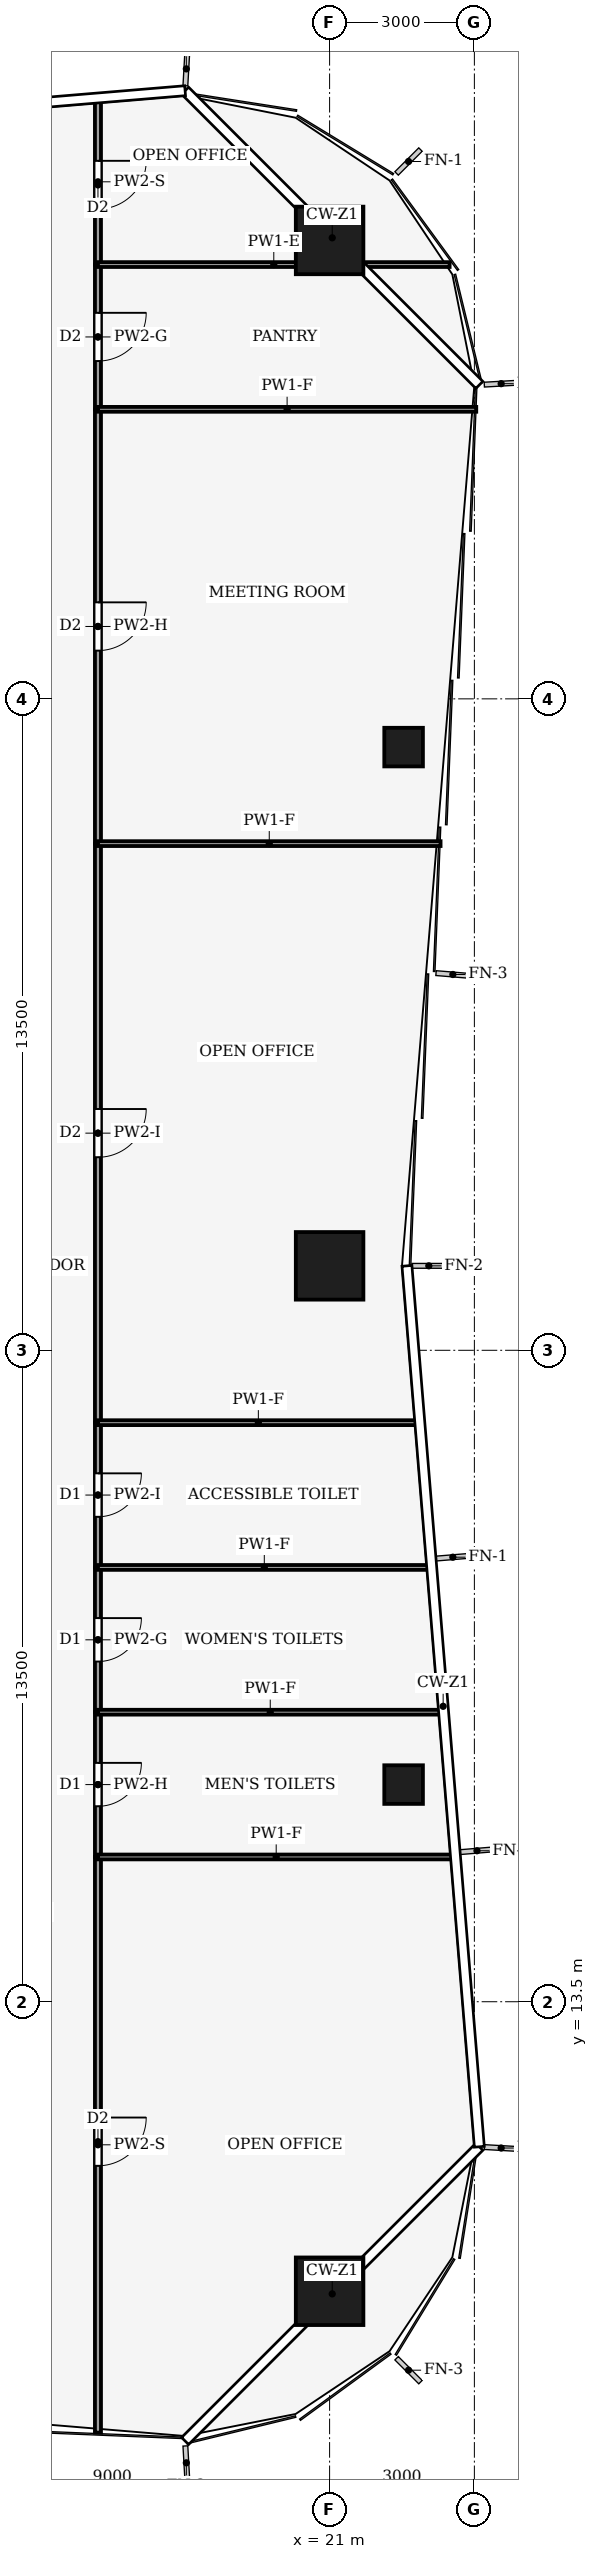
"""IFC4 building model, lengths in metres.
Left out: names, types, materials, properties, quantities, classifications, styles, units other than length and angle.
Written with IfcOpenShell. Run it as: python <this file> out.ifc"""

import sys

from ifc_helpers import new_model, si_unit, direction, frame, frame_2d, origin, origin_2d, place, context, subcontext, project, spatial, rectangle, hollow_rectangle, extrude, element, fill, save


model = new_model("IFC4")
c1 = context("Model", 3, precision=1e-05, world=origin(), true_north=direction((0.0, 1.0)))
c2 = subcontext(c1, "Body", "Model", "MODEL_VIEW")
j1 = project(units=[si_unit("LENGTHUNIT", "METRE"), si_unit("PLANEANGLEUNIT", "RADIAN")], contexts=[c1])
p1 = place(None, origin())
s1 = spatial("IfcSite", under=j1, at=p1, CompositionType="ELEMENT")
p2 = place(p1, origin())
s2 = spatial("IfcBuilding", under=s1, at=p2, CompositionType="ELEMENT")
p3 = place(p2, frame((0.0, 0.0, 70.0)))
s3 = spatial("IfcBuildingStorey", under=s2, at=p3, CompositionType="ELEMENT", Elevation=70.0)
for number, where, z_axis, x_axis in (
    (1, (21.0, 50.0, 0.0), (0.0, 0.0, 1.0), (1.0, 0.0, 0.0)),
    (2, (21.0, 28.75, 0.0), (0.0, 0.0, 1.0), (1.0, 0.0, 0.0)),
    (3, (21.0, 7.5, 0.0), (0.0, 0.0, 1.0), (1.0, 0.0, 0.0)),
):
    element("IfcColumn", number, at=place(p3, frame(where, z_axis=z_axis, x_axis=x_axis)), inside=s3, PredefinedType="COLUMN", context=c2, shape_type="SweptSolid", body=[
        extrude(hollow_rectangle(XDim=1.4, YDim=1.4, WallThickness=0.08, at=origin_2d()), origin(), (0.0, 0.0, 1.0), 4.0),
    ])
for number, where, z_axis, x_axis in (
    (4, (22.534, 18.0, 0.0), (0.0, 0.0, 1.0), (1.0, 0.0, 0.0)),
    (5, (22.534, 39.5, 0.0), (0.0, 0.0, 1.0), (1.0, 0.0, 0.0)),
):
    element("IfcColumn", number, at=place(p3, frame(where, z_axis=z_axis, x_axis=x_axis)), inside=s3, PredefinedType="COLUMN", context=c2, shape_type="SweptSolid", body=[
        extrude(hollow_rectangle(XDim=0.8, YDim=0.8, WallThickness=0.04, at=origin_2d()), origin(), (0.0, 0.0, 1.0), 4.0),
    ])
p4 = place(p3, frame((16.2, 16.5, 0.0), z_axis=(0.0, 0.0, 1.0), x_axis=(0.0, -1.0, 0.0)))
e6 = element("IfcWall", 6, at=p4, inside=s3, PredefinedType="PARTITIONING", context=c2, shape_type="SweptSolid", body=[
    extrude(rectangle(XDim=11.93, YDim=0.125, at=frame_2d((5.965, 0.0))), origin(), (0.0, 0.0, 1.0), 3.04),
])
p5 = place(p4, frame((5.4, 0.0, 0.0)))
e7 = element("IfcOpeningElement", 7, at=p5, cuts=e6, PredefinedType="OPENING", context=c2, shape_type="SweptSolid", body=[
    extrude(rectangle(XDim=1.0, YDim=2.1, at=frame_2d((0.5, 1.05))), frame((0.0, 0.073, 0.0), z_axis=(0.0, -1.0, 0.0), x_axis=(1.0, 0.0, 0.0)), (0.0, 0.0, 1.0), 0.145),
])
p6 = place(p3, frame((16.2, 19.5, 0.0), z_axis=(0.0, 0.0, 1.0), x_axis=(0.0, -1.0, 0.0)))
e8 = element("IfcWall", 8, at=p6, inside=s3, PredefinedType="PARTITIONING", context=c2, shape_type="SweptSolid", body=[
    extrude(rectangle(XDim=3.0, YDim=0.125, at=frame_2d((1.5, 0.0))), origin(), (0.0, 0.0, 1.0), 3.14),
])
p7 = place(p6, frame((1.05, 0.0, 0.0)))
e9 = element("IfcOpeningElement", 9, at=p7, cuts=e8, PredefinedType="OPENING", context=c2, shape_type="SweptSolid", body=[
    extrude(rectangle(XDim=0.9, YDim=2.1, at=frame_2d((0.45, 1.05))), frame((0.0, 0.073, 0.0), z_axis=(0.0, -1.0, 0.0), x_axis=(1.0, 0.0, 0.0)), (0.0, 0.0, 1.0), 0.145),
])
p8 = place(p3, frame((16.2, 22.5, 0.0), z_axis=(0.0, 0.0, 1.0), x_axis=(0.0, -1.0, 0.0)))
e10 = element("IfcWall", 10, at=p8, inside=s3, PredefinedType="PARTITIONING", context=c2, shape_type="SweptSolid", body=[
    extrude(rectangle(XDim=3.0, YDim=0.125, at=frame_2d((1.5, 0.0))), origin(), (0.0, 0.0, 1.0), 3.87),
])
p9 = place(p8, frame((1.05, 0.0, 0.0)))
e11 = element("IfcOpeningElement", 11, at=p9, cuts=e10, PredefinedType="OPENING", context=c2, shape_type="SweptSolid", body=[
    extrude(rectangle(XDim=0.9, YDim=2.1, at=frame_2d((0.45, 1.05))), frame((0.0, 0.073, 0.0), z_axis=(0.0, -1.0, 0.0), x_axis=(1.0, 0.0, 0.0)), (0.0, 0.0, 1.0), 0.145),
])
p10 = place(p3, frame((16.2, 25.5, 0.0), z_axis=(0.0, 0.0, 1.0), x_axis=(0.0, -1.0, 0.0)))
e12 = element("IfcWall", 12, at=p10, inside=s3, PredefinedType="PARTITIONING", context=c2, shape_type="SweptSolid", body=[
    extrude(rectangle(XDim=3.0, YDim=0.125, at=frame_2d((1.5, 0.0))), origin(), (0.0, 0.0, 1.0), 3.48),
])
p11 = place(p10, frame((1.05, 0.0, 0.0)))
e13 = element("IfcOpeningElement", 13, at=p11, cuts=e12, PredefinedType="OPENING", context=c2, shape_type="SweptSolid", body=[
    extrude(rectangle(XDim=0.9, YDim=2.1, at=frame_2d((0.45, 1.05))), frame((0.0, 0.073, 0.0), z_axis=(0.0, -1.0, 0.0), x_axis=(1.0, 0.0, 0.0)), (0.0, 0.0, 1.0), 0.145),
])
p12 = place(p3, frame((16.2, 37.5, 0.0), z_axis=(0.0, 0.0, 1.0), x_axis=(0.0, -1.0, 0.0)))
e14 = element("IfcWall", 14, at=p12, inside=s3, PredefinedType="PARTITIONING", context=c2, shape_type="SweptSolid", body=[
    extrude(rectangle(XDim=12.0, YDim=0.125, at=frame_2d((6.0, 0.0))), origin(), (0.0, 0.0, 1.0), 3.48),
])
p13 = place(p12, frame((5.5, 0.0, 0.0)))
e15 = element("IfcOpeningElement", 15, at=p13, cuts=e14, PredefinedType="OPENING", context=c2, shape_type="SweptSolid", body=[
    extrude(rectangle(XDim=1.0, YDim=2.1, at=frame_2d((0.5, 1.05))), frame((0.0, 0.073, 0.0), z_axis=(0.0, -1.0, 0.0), x_axis=(1.0, 0.0, 0.0)), (0.0, 0.0, 1.0), 0.145),
])
p14 = place(p3, frame((16.2, 46.5, 0.0), z_axis=(0.0, 0.0, 1.0), x_axis=(0.0, -1.0, 0.0)))
e16 = element("IfcWall", 16, at=p14, inside=s3, PredefinedType="PARTITIONING", context=c2, shape_type="SweptSolid", body=[
    extrude(rectangle(XDim=9.0, YDim=0.125, at=frame_2d((4.5, 0.0))), origin(), (0.0, 0.0, 1.0), 3.14),
])
p15 = place(p14, frame((4.0, 0.0, 0.0)))
e17 = element("IfcOpeningElement", 17, at=p15, cuts=e16, PredefinedType="OPENING", context=c2, shape_type="SweptSolid", body=[
    extrude(rectangle(XDim=1.0, YDim=2.1, at=frame_2d((0.5, 1.05))), frame((0.0, 0.073, 0.0), z_axis=(0.0, -1.0, 0.0), x_axis=(1.0, 0.0, 0.0)), (0.0, 0.0, 1.0), 0.145),
])
p16 = place(p3, frame((16.2, 49.5, 0.0), z_axis=(0.0, 0.0, 1.0), x_axis=(0.0, -1.0, 0.0)))
e18 = element("IfcWall", 18, at=p16, inside=s3, PredefinedType="PARTITIONING", context=c2, shape_type="SweptSolid", body=[
    extrude(rectangle(XDim=3.0, YDim=0.125, at=frame_2d((1.5, 0.0))), origin(), (0.0, 0.0, 1.0), 3.87),
])
p17 = place(p16, frame((1.0, 0.0, 0.0)))
e19 = element("IfcOpeningElement", 19, at=p17, cuts=e18, PredefinedType="OPENING", context=c2, shape_type="SweptSolid", body=[
    extrude(rectangle(XDim=1.0, YDim=2.1, at=frame_2d((0.5, 1.05))), frame((0.0, 0.073, 0.0), z_axis=(0.0, -1.0, 0.0), x_axis=(1.0, 0.0, 0.0)), (0.0, 0.0, 1.0), 0.145),
])
p18 = place(p3, frame((16.2, 52.93, 0.0), z_axis=(0.0, 0.0, 1.0), x_axis=(0.0, -1.0, 0.0)))
e20 = element("IfcWall", 20, at=p18, inside=s3, PredefinedType="PARTITIONING", context=c2, shape_type="SweptSolid", body=[
    extrude(rectangle(XDim=3.43, YDim=0.125, at=frame_2d((1.715, 0.0))), origin(), (0.0, 0.0, 1.0), 3.04),
])
p19 = place(p18, frame((1.28, 0.0, 0.0)))
e21 = element("IfcOpeningElement", 21, at=p19, cuts=e20, PredefinedType="OPENING", context=c2, shape_type="SweptSolid", body=[
    extrude(rectangle(XDim=1.0, YDim=2.1, at=frame_2d((0.5, 1.05))), frame((0.0, 0.073, 0.0), z_axis=(0.0, -1.0, 0.0), x_axis=(1.0, 0.0, 0.0)), (0.0, 0.0, 1.0), 0.145),
])
p20 = place(p3, frame((23.587, 16.5, 0.0), z_axis=(0.0, 0.0, 1.0), x_axis=(-1.0, 0.0, 0.0)))
e22 = element("IfcWall", 22, at=p20, inside=s3, PredefinedType="PARTITIONING", context=c2, shape_type="SweptSolid", body=[
    extrude(rectangle(XDim=7.387, YDim=0.1, at=frame_2d((3.693, 0.0))), origin(), (0.0, 0.0, 1.0), 3.04),
])
p21 = place(p3, frame((23.34, 19.5, 0.0), z_axis=(0.0, 0.0, 1.0), x_axis=(-1.0, 0.0, 0.0)))
e23 = element("IfcWall", 23, at=p21, inside=s3, PredefinedType="PARTITIONING", context=c2, shape_type="SweptSolid", body=[
    extrude(rectangle(XDim=7.14, YDim=0.1, at=frame_2d((3.57, 0.0))), origin(), (0.0, 0.0, 1.0), 3.04),
])
p22 = place(p3, frame((23.094, 22.5, 0.0), z_axis=(0.0, 0.0, 1.0), x_axis=(-1.0, 0.0, 0.0)))
e24 = element("IfcWall", 24, at=p22, inside=s3, PredefinedType="PARTITIONING", context=c2, shape_type="SweptSolid", body=[
    extrude(rectangle(XDim=6.894, YDim=0.1, at=frame_2d((3.447, 0.0))), origin(), (0.0, 0.0, 1.0), 3.04),
])
p23 = place(p3, frame((22.847, 25.5, 0.0), z_axis=(0.0, 0.0, 1.0), x_axis=(-1.0, 0.0, 0.0)))
e25 = element("IfcWall", 25, at=p23, inside=s3, PredefinedType="PARTITIONING", context=c2, shape_type="SweptSolid", body=[
    extrude(rectangle(XDim=6.647, YDim=0.1, at=frame_2d((3.324, 0.0))), origin(), (0.0, 0.0, 1.0), 3.04),
])
p24 = place(p3, frame((23.299, 37.5, 0.0), z_axis=(0.0, 0.0, 1.0), x_axis=(-1.0, 0.0, 0.0)))
e26 = element("IfcWall", 26, at=p24, inside=s3, PredefinedType="PARTITIONING", context=c2, shape_type="SweptSolid", body=[
    extrude(rectangle(XDim=7.099, YDim=0.1, at=frame_2d((3.55, 0.0))), origin(), (0.0, 0.0, 1.0), 3.04),
])
p25 = place(p3, frame((24.039, 46.5, 0.0), z_axis=(0.0, 0.0, 1.0), x_axis=(-1.0, 0.0, 0.0)))
e27 = element("IfcWall", 27, at=p25, inside=s3, PredefinedType="PARTITIONING", context=c2, shape_type="SweptSolid", body=[
    extrude(rectangle(XDim=7.839, YDim=0.1, at=frame_2d((3.919, 0.0))), origin(), (0.0, 0.0, 1.0), 3.04),
])
p26 = place(p3, frame((23.487, 49.5, 0.0), z_axis=(0.0, 0.0, 1.0), x_axis=(-1.0, 0.0, 0.0)))
e28 = element("IfcWall", 28, at=p26, inside=s3, PredefinedType="PARTITIONING", context=c2, shape_type="SweptSolid", body=[
    extrude(rectangle(XDim=7.287, YDim=0.1, at=frame_2d((3.644, 0.0))), origin(), (0.0, 0.0, 1.0), 3.34),
])
p27 = place(p5, origin())
e29 = element("IfcDoor", 29, at=p27, inside=s3, OperationType="SINGLE_SWING_LEFT", PredefinedType="DOOR", context=c2, shape_type="SweptSolid", body=[
    extrude(rectangle(XDim=1.0, YDim=2.1, at=frame_2d((0.5, 1.05))), frame((0.0, 0.025, 0.0), z_axis=(0.0, -1.0, 0.0), x_axis=(1.0, 0.0, 0.0)), (0.0, 0.0, 1.0), 0.05),
])
fill(e7, e29)
p28 = place(p7, origin())
e30 = element("IfcDoor", 30, at=p28, inside=s3, OperationType="SINGLE_SWING_RIGHT", PredefinedType="DOOR", context=c2, shape_type="SweptSolid", body=[
    extrude(rectangle(XDim=0.9, YDim=2.1, at=frame_2d((0.45, 1.05))), frame((0.0, 0.025, 0.0), z_axis=(0.0, -1.0, 0.0), x_axis=(1.0, 0.0, 0.0)), (0.0, 0.0, 1.0), 0.05),
])
fill(e9, e30)
p29 = place(p9, origin())
e31 = element("IfcDoor", 31, at=p29, inside=s3, OperationType="SINGLE_SWING_LEFT", PredefinedType="DOOR", context=c2, shape_type="SweptSolid", body=[
    extrude(rectangle(XDim=0.9, YDim=2.1, at=frame_2d((0.45, 1.05))), frame((0.0, 0.025, 0.0), z_axis=(0.0, -1.0, 0.0), x_axis=(1.0, 0.0, 0.0)), (0.0, 0.0, 1.0), 0.05),
])
fill(e11, e31)
p30 = place(p11, origin())
e32 = element("IfcDoor", 32, at=p30, inside=s3, OperationType="SINGLE_SWING_RIGHT", PredefinedType="DOOR", context=c2, shape_type="SweptSolid", body=[
    extrude(rectangle(XDim=0.9, YDim=2.1, at=frame_2d((0.45, 1.05))), frame((0.0, 0.025, 0.0), z_axis=(0.0, -1.0, 0.0), x_axis=(1.0, 0.0, 0.0)), (0.0, 0.0, 1.0), 0.05),
])
fill(e13, e32)
p31 = place(p13, origin())
e33 = element("IfcDoor", 33, at=p31, inside=s3, OperationType="SINGLE_SWING_LEFT", PredefinedType="DOOR", context=c2, shape_type="SweptSolid", body=[
    extrude(rectangle(XDim=1.0, YDim=2.1, at=frame_2d((0.5, 1.05))), frame((0.0, 0.025, 0.0), z_axis=(0.0, -1.0, 0.0), x_axis=(1.0, 0.0, 0.0)), (0.0, 0.0, 1.0), 0.05),
])
fill(e15, e33)
p32 = place(p15, origin())
e34 = element("IfcDoor", 34, at=p32, inside=s3, OperationType="SINGLE_SWING_RIGHT", PredefinedType="DOOR", context=c2, shape_type="SweptSolid", body=[
    extrude(rectangle(XDim=1.0, YDim=2.1, at=frame_2d((0.5, 1.05))), frame((0.0, 0.025, 0.0), z_axis=(0.0, -1.0, 0.0), x_axis=(1.0, 0.0, 0.0)), (0.0, 0.0, 1.0), 0.05),
])
fill(e17, e34)
p33 = place(p17, origin())
e35 = element("IfcDoor", 35, at=p33, inside=s3, OperationType="SINGLE_SWING_LEFT", PredefinedType="DOOR", context=c2, shape_type="SweptSolid", body=[
    extrude(rectangle(XDim=1.0, YDim=2.1, at=frame_2d((0.5, 1.05))), frame((0.0, 0.025, 0.0), z_axis=(0.0, -1.0, 0.0), x_axis=(1.0, 0.0, 0.0)), (0.0, 0.0, 1.0), 0.05),
])
fill(e19, e35)
p34 = place(p19, origin())
e36 = element("IfcDoor", 36, at=p34, inside=s3, OperationType="SINGLE_SWING_RIGHT", PredefinedType="DOOR", context=c2, shape_type="SweptSolid", body=[
    extrude(rectangle(XDim=1.0, YDim=2.1, at=frame_2d((0.5, 1.05))), frame((0.0, 0.025, 0.0), z_axis=(0.0, -1.0, 0.0), x_axis=(1.0, 0.0, 0.0)), (0.0, 0.0, 1.0), 0.05),
])
fill(e21, e36)
save(model, sys.argv[1])
